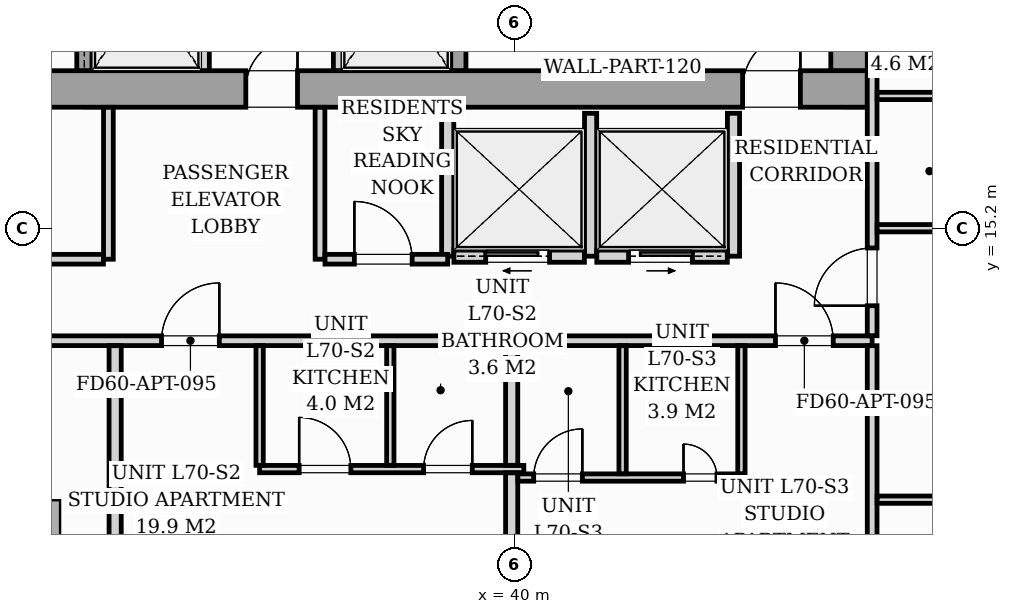
"""IFC4 building model, lengths in metres.
Left out: names, types, materials, properties, quantities, classifications, styles, units other than length and angle.
Written with IfcOpenShell. Run it as: python <this file> out.ifc"""

import sys

from ifc_helpers import new_model, si_unit, direction, frame, frame_2d, origin, origin_2d, place, context, subcontext, project, spatial, rectangle, i_section, extrude, source, transform, mapped, element, fill, save


model = new_model("IFC4")
c1 = context("Model", 3, precision=1e-05, world=origin(), true_north=direction((0.0, 1.0)))
c2 = subcontext(c1, "Body", "Model", "MODEL_VIEW")
j1 = project(units=[si_unit("LENGTHUNIT", "METRE"), si_unit("PLANEANGLEUNIT", "RADIAN")], contexts=[c1])
p1 = place(None, origin())
s1 = spatial("IfcSite", under=j1, at=p1, CompositionType="ELEMENT")
p2 = place(p1, origin())
s2 = spatial("IfcBuilding", under=s1, at=p2, CompositionType="ELEMENT")
p3 = place(p2, frame((0.0, 0.0, 243.0)))
s3 = spatial("IfcBuildingStorey", under=s2, at=p3, CompositionType="ELEMENT", Elevation=243.0)
m1 = source(origin(), c2, "Body", "SweptSolid", [
    extrude(i_section(OverallWidth=0.409, OverallDepth=0.425, WebThickness=0.033, FlangeThickness=0.052, FilletRadius=0.018, at=origin_2d()), origin(), (0.0, 0.0, 1.0), 3.296),
])
for number, where, z_axis, x_axis in (
    (1, (33.12, 17.4, 0.002), (0.0, 0.0, 1.0), (1.0, 0.0, 0.0)),
    (2, (38.88, 17.4, 0.002), (0.0, 0.0, 1.0), (1.0, 0.0, 0.0)),
    (3, (45.6, 17.4, 0.002), (0.0, 0.0, 1.0), (1.0, 0.0, 0.0)),
):
    element("IfcColumn", number, at=place(p3, frame(where, z_axis=z_axis, x_axis=x_axis)), inside=s3, PredefinedType="PILASTER", context=c2, shape_type="MappedRepresentation", body=[
        mapped(m1, transform((0.0, 0.0, 0.0), scale=1.0)),
    ])
m2 = source(origin(), c2, "Body", "SweptSolid", [
    extrude(rectangle(XDim=0.85, YDim=0.85, at=origin_2d()), origin(), (0.0, 0.0, 1.0), 3.296),
])
p4 = place(p3, frame((32.1, 10.312, 0.002), z_axis=(0.0, 0.0, 1.0), x_axis=(0.995884398616, -0.090632580198, 0.0)))
e4 = element("IfcColumn", 4, at=p4, inside=s3, PredefinedType="COLUMN", context=c2, shape_type="MappedRepresentation", body=[
    mapped(m2, transform((0.0, 0.0, 0.0), scale=1.0)),
])
p5 = place(p3, frame((26.2, 17.5, 0.0), z_axis=(0.0, 0.0, 1.0), x_axis=(1.0, 0.0, 0.0)))
e5 = element("IfcWall", 5, at=p5, inside=s3, PredefinedType="SHEAR", context=c2, shape_type="SweptSolid", body=[
    extrude(rectangle(XDim=19.6, YDim=0.6, at=frame_2d((9.8, 0.0))), origin(), (0.0, 0.0, 1.0), 3.3),
])
p6 = place(p5, frame((0.95, 0.0, 0.0)))
e6 = element("IfcOpeningElement", 6, at=p6, cuts=e5, PredefinedType="OPENING", context=c2, shape_type="SweptSolid", body=[
    extrude(rectangle(XDim=0.95, YDim=2.06, at=frame_2d((0.475, 1.03))), frame((0.0, 0.31, 0.0), z_axis=(0.0, -1.0, 0.0), x_axis=(1.0, 0.0, 0.0)), (0.0, 0.0, 1.0), 0.62),
])
p7 = place(p5, frame((9.38, 0.0, 0.0)))
e7 = element("IfcOpeningElement", 7, at=p7, cuts=e5, PredefinedType="OPENING", context=c2, shape_type="SweptSolid", body=[
    extrude(rectangle(XDim=0.85, YDim=2.0, at=frame_2d((0.425, 1.0))), frame((0.0, 0.31, 0.0), z_axis=(0.0, -1.0, 0.0), x_axis=(1.0, 0.0, 0.0)), (0.0, 0.0, 1.0), 0.62),
])
p8 = place(p5, frame((17.55, 0.0, 0.0)))
e8 = element("IfcOpeningElement", 8, at=p8, cuts=e5, PredefinedType="OPENING", context=c2, shape_type="SweptSolid", body=[
    extrude(rectangle(XDim=0.95, YDim=2.06, at=frame_2d((0.475, 1.03))), frame((0.0, 0.31, 0.0), z_axis=(0.0, -1.0, 0.0), x_axis=(1.0, 0.0, 0.0)), (0.0, 0.0, 1.0), 0.62),
])
p9 = place(p3, frame((45.5, 17.802, 0.0), z_axis=(0.0, 0.0, 1.0), x_axis=(0.0, 1.0, 0.0)))
e9 = element("IfcWall", 9, at=p9, inside=s3, PredefinedType="SHEAR", context=c2, shape_type="SweptSolid", body=[
    extrude(rectangle(XDim=5.796, YDim=0.6, at=frame_2d((2.898, 0.0))), origin(), (0.0, 0.0, 1.0), 3.3),
])
p10 = place(p3, frame((32.925, 17.802, 0.0), z_axis=(0.0, 0.0, 1.0), x_axis=(0.0, 1.0, 0.0)))
e10 = element("IfcWall", 10, at=p10, inside=s3, PredefinedType="SOLIDWALL", context=c2, shape_type="SweptSolid", body=[
    extrude(rectangle(XDim=2.646, YDim=0.25, at=frame_2d((1.323, 0.0))), origin(), (0.0, 0.0, 1.0), 3.3),
])
p11 = place(p10, frame((0.548, 0.0, 0.0)))
e11 = element("IfcOpeningElement", 11, at=p11, cuts=e10, PredefinedType="OPENING", context=c2, shape_type="SweptSolid", body=[
    extrude(rectangle(XDim=1.1, YDim=2.08, at=frame_2d((0.55, 1.04))), frame((0.0, 0.135, 0.0), z_axis=(0.0, -1.0, 0.0), x_axis=(1.0, 0.0, 0.0)), (0.0, 0.0, 1.0), 0.27),
])
for number, where, z_axis, x_axis in (
    (12, (34.9, 17.802, 0.0), (0.0, 0.0, 1.0), (0.0, 1.0, 0.0)),
    (13, (37.1, 17.802, 0.0), (0.0, 0.0, 1.0), (0.0, 1.0, 0.0)),
):
    element("IfcWall", number, at=place(p3, frame(where, z_axis=z_axis, x_axis=x_axis)), inside=s3, PredefinedType="PARTITIONING", context=c2, shape_type="SweptSolid", body=[
        extrude(rectangle(XDim=2.646, YDim=0.16, at=frame_2d((1.323, 0.0))), origin(), (0.0, 0.0, 1.0), 3.04),
    ])
p12 = place(p3, frame((39.075, 17.802, 0.0), z_axis=(0.0, 0.0, 1.0), x_axis=(0.0, 1.0, 0.0)))
e14 = element("IfcWall", 14, at=p12, inside=s3, PredefinedType="SOLIDWALL", context=c2, shape_type="SweptSolid", body=[
    extrude(rectangle(XDim=2.646, YDim=0.25, at=frame_2d((1.323, 0.0))), origin(), (0.0, 0.0, 1.0), 3.3),
])
p13 = place(p12, frame((0.548, 0.0, 0.0)))
e15 = element("IfcOpeningElement", 15, at=p13, cuts=e14, PredefinedType="OPENING", context=c2, shape_type="SweptSolid", body=[
    extrude(rectangle(XDim=1.1, YDim=2.08, at=frame_2d((0.55, 1.04))), frame((0.0, 0.135, 0.0), z_axis=(0.0, -1.0, 0.0), x_axis=(1.0, 0.0, 0.0)), (0.0, 0.0, 1.0), 0.27),
])
for number, where, z_axis, x_axis in (
    (16, (38.9, 14.75, 0.0), (0.0, 0.0, 1.0), (0.0, 1.0, 0.0)),
    (17, (41.25, 14.75, 0.0), (0.0, 0.0, 1.0), (0.0, 1.0, 0.0)),
    (18, (43.6, 14.75, 0.0), (0.0, 0.0, 1.0), (0.0, 1.0, 0.0)),
):
    element("IfcWall", number, at=place(p3, frame(where, z_axis=z_axis, x_axis=x_axis)), inside=s3, PredefinedType="PARTITIONING", context=c2, shape_type="SweptSolid", body=[
        extrude(rectangle(XDim=2.35, YDim=0.2, at=frame_2d((1.175, 0.0))), origin(), (0.0, 0.0, 1.0), 3.04),
    ])
p14 = place(p3, frame((39.002, 14.75, 0.0), z_axis=(0.0, 0.0, 1.0), x_axis=(1.0, 0.0, 0.0)))
e19 = element("IfcWall", 19, at=p14, inside=s3, PredefinedType="PARTITIONING", context=c2, shape_type="SweptSolid", body=[
    extrude(rectangle(XDim=2.146, YDim=0.2, at=frame_2d((1.073, 0.0))), origin(), (0.0, 0.0, 1.0), 3.04),
])
p15 = place(p14, frame((0.523, 0.0, 0.0)))
e20 = element("IfcOpeningElement", 20, at=p15, cuts=e19, PredefinedType="OPENING", context=c2, shape_type="SweptSolid", body=[
    extrude(rectangle(XDim=1.05, YDim=2.08, at=frame_2d((0.525, 1.04))), frame((0.0, 0.11, 0.0), z_axis=(0.0, -1.0, 0.0), x_axis=(1.0, 0.0, 0.0)), (0.0, 0.0, 1.0), 0.22),
])
p16 = place(p3, frame((41.352, 14.75, 0.0), z_axis=(0.0, 0.0, 1.0), x_axis=(1.0, 0.0, 0.0)))
e21 = element("IfcWall", 21, at=p16, inside=s3, PredefinedType="PARTITIONING", context=c2, shape_type="SweptSolid", body=[
    extrude(rectangle(XDim=2.146, YDim=0.2, at=frame_2d((1.073, 0.0))), origin(), (0.0, 0.0, 1.0), 3.04),
])
p17 = place(p16, frame((0.523, 0.0, 0.0)))
e22 = element("IfcOpeningElement", 22, at=p17, cuts=e21, PredefinedType="OPENING", context=c2, shape_type="SweptSolid", body=[
    extrude(rectangle(XDim=1.05, YDim=2.08, at=frame_2d((0.525, 1.04))), frame((0.0, 0.11, 0.0), z_axis=(0.0, -1.0, 0.0), x_axis=(1.0, 0.0, 0.0)), (0.0, 0.0, 1.0), 0.22),
])
p18 = place(p3, frame((26.12, 13.36, 0.0), z_axis=(0.0, 0.0, 1.0), x_axis=(1.0, 0.0, 0.0)))
e23 = element("IfcWall", 23, at=p18, inside=s3, PredefinedType="PARTITIONING", context=c2, shape_type="SweptSolid", body=[
    extrude(rectangle(XDim=19.76, YDim=0.16, at=frame_2d((9.88, 0.0))), origin(), (0.0, 0.0, 1.0), 2.55),
])
p19 = place(p18, frame((5.221, 0.0, 0.0)))
e24 = element("IfcOpeningElement", 24, at=p19, cuts=e23, PredefinedType="OPENING", context=c2, shape_type="SweptSolid", body=[
    extrude(rectangle(XDim=0.95, YDim=2.06, at=frame_2d((0.475, 1.03))), frame((0.0, 0.09, 0.0), z_axis=(0.0, -1.0, 0.0), x_axis=(1.0, 0.0, 0.0)), (0.0, 0.0, 1.0), 0.18),
])
p20 = place(p18, frame((8.074, 0.0, 0.0)))
e25 = element("IfcOpeningElement", 25, at=p20, cuts=e23, PredefinedType="OPENING", context=c2, shape_type="SweptSolid", body=[
    extrude(rectangle(XDim=0.95, YDim=2.06, at=frame_2d((0.475, 1.03))), frame((0.0, 0.09, 0.0), z_axis=(0.0, -1.0, 0.0), x_axis=(1.0, 0.0, 0.0)), (0.0, 0.0, 1.0), 0.18),
])
p21 = place(p18, frame((18.17, 0.0, 0.0)))
e26 = element("IfcOpeningElement", 26, at=p21, cuts=e23, PredefinedType="OPENING", context=c2, shape_type="SweptSolid", body=[
    extrude(rectangle(XDim=0.95, YDim=2.06, at=frame_2d((0.475, 1.03))), frame((0.0, 0.09, 0.0), z_axis=(0.0, -1.0, 0.0), x_axis=(1.0, 0.0, 0.0)), (0.0, 0.0, 1.0), 0.18),
])
p22 = place(p3, frame((45.88, 8.136, 0.0), z_axis=(0.0, 0.0, 1.0), x_axis=(0.0, 1.0, 0.0)))
e27 = element("IfcWall", 27, at=p22, inside=s3, PredefinedType="PARTITIONING", context=c2, shape_type="SweptSolid", body=[
    extrude(rectangle(XDim=5.142, YDim=0.16, at=frame_2d((2.571, 0.0))), origin(), (0.0, 0.0, 1.0), 3.04),
])
p23 = place(p3, frame((45.88, 13.442, 0.0), z_axis=(0.0, 0.0, 1.0), x_axis=(0.0, 1.0, 0.0)))
e28 = element("IfcWall", 28, at=p23, inside=s3, PredefinedType="PARTITIONING", context=c2, shape_type="SweptSolid", body=[
    extrude(rectangle(XDim=4.36, YDim=0.16, at=frame_2d((2.18, 0.0))), origin(), (0.0, 0.0, 1.0), 3.04),
])
p24 = place(p23, frame((0.493, 0.0, 0.0)))
e29 = element("IfcOpeningElement", 29, at=p24, cuts=e28, PredefinedType="OPENING", context=c2, shape_type="SweptSolid", body=[
    extrude(rectangle(XDim=0.95, YDim=2.06, at=frame_2d((0.475, 1.03))), frame((0.0, 0.09, 0.0), z_axis=(0.0, -1.0, 0.0), x_axis=(1.0, 0.0, 0.0)), (0.0, 0.0, 1.0), 0.18),
])
p25 = place(p3, frame((33.431, 9.086, 0.0), z_axis=(0.0, 0.0, 1.0), x_axis=(0.0, 1.0, 0.0)))
e30 = element("IfcWall", 30, at=p25, inside=s3, PredefinedType="PARTITIONING", context=c2, shape_type="SweptSolid", body=[
    extrude(rectangle(XDim=4.192, YDim=0.2, at=frame_2d((2.096, 0.0))), origin(), (0.0, 0.0, 1.0), 3.04),
])
p26 = place(p3, frame((35.807, 11.249, 0.0), z_axis=(0.0, 0.0, 1.0), x_axis=(1.0, 0.0, 0.0)))
e31 = element("IfcWall", 31, at=p26, inside=s3, PredefinedType="PARTITIONING", context=c2, shape_type="SweptSolid", body=[
    extrude(rectangle(XDim=4.345, YDim=0.12, at=frame_2d((2.173, 0.0))), origin(), (0.0, 0.0, 1.0), 3.04),
])
p27 = place(p26, frame((0.65, 0.0, 0.0)))
e32 = element("IfcOpeningElement", 32, at=p27, cuts=e31, PredefinedType="OPENING", context=c2, shape_type="SweptSolid", body=[
    extrude(rectangle(XDim=0.85, YDim=2.05, at=frame_2d((0.425, 1.025))), frame((0.0, 0.07, 0.0), z_axis=(0.0, -1.0, 0.0), x_axis=(1.0, 0.0, 0.0)), (0.0, 0.0, 1.0), 0.14),
])
p28 = place(p26, frame((2.697, 0.0, 0.0)))
e33 = element("IfcOpeningElement", 33, at=p28, cuts=e31, PredefinedType="OPENING", context=c2, shape_type="SweptSolid", body=[
    extrude(rectangle(XDim=0.8, YDim=2.02, at=frame_2d((0.4, 1.01))), frame((0.0, 0.07, 0.0), z_axis=(0.0, -1.0, 0.0), x_axis=(1.0, 0.0, 0.0)), (0.0, 0.0, 1.0), 0.14),
])
for number, where, z_axis, x_axis in (
    (34, (35.807, 11.311, 0.0), (0.0, 0.0, 1.0), (0.0, 1.0, 0.0)),
    (35, (37.956, 11.311, 0.0), (0.0, 0.0, 1.0), (0.0, 1.0, 0.0)),
):
    element("IfcWall", number, at=place(p3, frame(where, z_axis=z_axis, x_axis=x_axis)), inside=s3, PredefinedType="PARTITIONING", context=c2, shape_type="SweptSolid", body=[
        extrude(rectangle(XDim=1.967, YDim=0.12, at=frame_2d((0.983, 0.0))), origin(), (0.0, 0.0, 1.0), 3.04),
    ])
p29 = place(p3, frame((39.952, 8.675, 0.0), z_axis=(0.0, 0.0, 1.0), x_axis=(0.0, 1.0, 0.0)))
e36 = element("IfcWall", 36, at=p29, inside=s3, PredefinedType="PARTITIONING", context=c2, shape_type="SweptSolid", body=[
    extrude(rectangle(XDim=2.512, YDim=0.2, at=frame_2d((1.256, 0.0))), origin(), (0.0, 0.0, 1.0), 3.04),
])
p30 = place(p3, frame((39.952, 11.311, 0.0), z_axis=(0.0, 0.0, 1.0), x_axis=(0.0, 1.0, 0.0)))
e37 = element("IfcWall", 37, at=p30, inside=s3, PredefinedType="PARTITIONING", context=c2, shape_type="SweptSolid", body=[
    extrude(rectangle(XDim=1.967, YDim=0.2, at=frame_2d((0.983, 0.0))), origin(), (0.0, 0.0, 1.0), 3.04),
])
p31 = place(p3, frame((40.054, 11.11, 0.0), z_axis=(0.0, 0.0, 1.0), x_axis=(1.0, 0.0, 0.0)))
e38 = element("IfcWall", 38, at=p31, inside=s3, PredefinedType="PARTITIONING", context=c2, shape_type="SweptSolid", body=[
    extrude(rectangle(XDim=3.676, YDim=0.12, at=frame_2d((1.838, 0.0))), origin(), (0.0, 0.0, 1.0), 3.04),
])
p32 = place(p31, frame((0.26, 0.0, 0.0)))
e39 = element("IfcOpeningElement", 39, at=p32, cuts=e38, PredefinedType="OPENING", context=c2, shape_type="SweptSolid", body=[
    extrude(rectangle(XDim=0.8, YDim=2.02, at=frame_2d((0.4, 1.01))), frame((0.0, 0.07, 0.0), z_axis=(0.0, -1.0, 0.0), x_axis=(1.0, 0.0, 0.0)), (0.0, 0.0, 1.0), 0.14),
])
p33 = place(p31, frame((2.724, 0.0, 0.0)))
e40 = element("IfcOpeningElement", 40, at=p33, cuts=e38, PredefinedType="OPENING", context=c2, shape_type="SweptSolid", body=[
    extrude(rectangle(XDim=0.55, YDim=2.0, at=frame_2d((0.275, 1.0))), frame((0.0, 0.07, 0.0), z_axis=(0.0, -1.0, 0.0), x_axis=(1.0, 0.0, 0.0)), (0.0, 0.0, 1.0), 0.14),
])
for number, where, z_axis, x_axis in (
    (41, (43.73, 11.172, 0.0), (0.0, 0.0, 1.0), (0.0, 1.0, 0.0)),
    (42, (41.776, 11.172, 0.0), (0.0, 0.0, 1.0), (0.0, 1.0, 0.0)),
):
    element("IfcWall", number, at=place(p3, frame(where, z_axis=z_axis, x_axis=x_axis)), inside=s3, PredefinedType="PARTITIONING", context=c2, shape_type="SweptSolid", body=[
        extrude(rectangle(XDim=2.106, YDim=0.12, at=frame_2d((1.053, 0.0))), origin(), (0.0, 0.0, 1.0), 3.04),
    ])
p34 = place(p3, frame((45.962, 17.385, 0.0), z_axis=(0.0, 0.0, 1.0), x_axis=(1.0, 0.0, 0.0)))
e43 = element("IfcWall", 43, at=p34, inside=s3, PredefinedType="PARTITIONING", context=c2, shape_type="SweptSolid", body=[
    extrude(rectangle(XDim=2.256, YDim=0.12, at=frame_2d((1.128, 0.0))), origin(), (0.0, 0.0, 1.0), 2.381),
])
p35 = place(p3, frame((45.962, 15.21, 0.0), z_axis=(0.0, 0.0, 1.0), x_axis=(1.0, 0.0, 0.0)))
e44 = element("IfcWall", 44, at=p35, inside=s3, PredefinedType="PARTITIONING", context=c2, shape_type="SweptSolid", body=[
    extrude(rectangle(XDim=2.256, YDim=0.12, at=frame_2d((1.128, 0.0))), origin(), (0.0, 0.0, 1.0), 3.04),
])
p36 = place(p3, frame((45.962, 10.746, 0.0), z_axis=(0.0, 0.0, 1.0), x_axis=(1.0, 0.0, 0.0)))
e45 = element("IfcWall", 45, at=p36, inside=s3, PredefinedType="PARTITIONING", context=c2, shape_type="SweptSolid", body=[
    extrude(rectangle(XDim=9.594, YDim=0.12, at=frame_2d((4.797, 0.0))), origin(), (0.0, 0.0, 1.0), 3.04),
])
p37 = place(p36, frame((4.378, 0.0, 0.0)))
e46 = element("IfcOpeningElement", 46, at=p37, cuts=e45, PredefinedType="OPENING", context=c2, shape_type="SweptSolid", body=[
    extrude(rectangle(XDim=0.85, YDim=2.05, at=frame_2d((0.425, 1.025))), frame((0.0, 0.07, 0.0), z_axis=(0.0, -1.0, 0.0), x_axis=(1.0, 0.0, 0.0)), (0.0, 0.0, 1.0), 0.14),
])
p38 = place(p3, frame((33.32, 14.7, 0.0), z_axis=(0.0, 0.0, 1.0), x_axis=(0.0, 1.0, 0.0)))
e47 = element("IfcWall", 47, at=p38, inside=s3, PredefinedType="PARTITIONING", context=c2, shape_type="SweptSolid", body=[
    extrude(rectangle(XDim=2.498, YDim=0.16, at=frame_2d((1.249, 0.0))), origin(), (0.0, 0.0, 1.0), 3.04),
])
p39 = place(p3, frame((28.442, 14.7, 0.0), z_axis=(0.0, 0.0, 1.0), x_axis=(1.0, 0.0, 0.0)))
e48 = element("IfcWall", 48, at=p39, inside=s3, PredefinedType="PARTITIONING", context=c2, shape_type="SweptSolid", body=[
    extrude(rectangle(XDim=4.796, YDim=0.16, at=frame_2d((2.398, 0.0))), origin(), (0.0, 0.0, 1.0), 2.55),
])
p40 = place(p39, frame((1.923, 0.0, 0.0)))
e49 = element("IfcOpeningElement", 49, at=p40, cuts=e48, PredefinedType="OPENING", context=c2, shape_type="SweptSolid", body=[
    extrude(rectangle(XDim=0.95, YDim=2.06, at=frame_2d((0.475, 1.03))), frame((0.0, 0.09, 0.0), z_axis=(0.0, -1.0, 0.0), x_axis=(1.0, 0.0, 0.0)), (0.0, 0.0, 1.0), 0.18),
])
p41 = place(p3, frame((36.8, 14.7, 0.0), z_axis=(0.0, 0.0, 1.0), x_axis=(0.0, 1.0, 0.0)))
e50 = element("IfcWall", 50, at=p41, inside=s3, PredefinedType="PARTITIONING", context=c2, shape_type="SweptSolid", body=[
    extrude(rectangle(XDim=2.498, YDim=0.16, at=frame_2d((1.249, 0.0))), origin(), (0.0, 0.0, 1.0), 3.04),
])
p42 = place(p3, frame((36.882, 14.7, 0.0), z_axis=(0.0, 0.0, 1.0), x_axis=(1.0, 0.0, 0.0)))
e51 = element("IfcWall", 51, at=p42, inside=s3, PredefinedType="PARTITIONING", context=c2, shape_type="SweptSolid", body=[
    extrude(rectangle(XDim=2.018, YDim=0.16, at=frame_2d((1.009, 0.0))), origin(), (0.0, 0.0, 1.0), 3.04),
])
p43 = place(p42, frame((0.483, 0.0, 0.0)))
e52 = element("IfcOpeningElement", 52, at=p43, cuts=e51, PredefinedType="OPENING", context=c2, shape_type="SweptSolid", body=[
    extrude(rectangle(XDim=0.95, YDim=2.06, at=frame_2d((0.475, 1.03))), frame((0.0, 0.09, 0.0), z_axis=(0.0, -1.0, 0.0), x_axis=(1.0, 0.0, 0.0)), (0.0, 0.0, 1.0), 0.18),
])
m3 = source(origin(), c2, "Body", "SweptSolid", [
    extrude(rectangle(XDim=0.85, YDim=2.0, at=frame_2d((0.425, 1.0))), frame((0.0, 0.025, 0.0), z_axis=(0.0, -1.0, 0.0), x_axis=(1.0, 0.0, 0.0)), (0.0, 0.0, 1.0), 0.05),
])
p44 = place(p7, origin())
e53 = element("IfcDoor", 53, at=p44, inside=s3, OperationType="SINGLE_SWING_RIGHT", PredefinedType="DOOR", context=c2, shape_type="MappedRepresentation", body=[
    mapped(m3, transform((0.0, 0.0, 0.0), scale=1.0)),
])
fill(e7, e53)
m4 = source(origin(), c2, "Body", "SweptSolid", [
    extrude(rectangle(XDim=0.95, YDim=2.06, at=frame_2d((0.475, 1.03))), frame((0.0, 0.025, 0.0), z_axis=(0.0, -1.0, 0.0), x_axis=(1.0, 0.0, 0.0)), (0.0, 0.0, 1.0), 0.05),
])
p45 = place(p8, origin())
e54 = element("IfcDoor", 54, at=p45, inside=s3, OperationType="SINGLE_SWING_RIGHT", PredefinedType="DOOR", context=c2, shape_type="MappedRepresentation", body=[
    mapped(m4, transform((0.0, 0.0, 0.0), scale=1.0)),
])
fill(e8, e54)
m5 = source(origin(), c2, "Body", "SweptSolid", [
    extrude(rectangle(XDim=1.05, YDim=2.08, at=frame_2d((0.525, 1.04))), frame((0.0, 0.025, 0.0), z_axis=(0.0, -1.0, 0.0), x_axis=(1.0, 0.0, 0.0)), (0.0, 0.0, 1.0), 0.05),
])
p46 = place(p15, origin())
e55 = element("IfcDoor", 55, at=p46, inside=s3, OperationType="SLIDING_TO_LEFT", PredefinedType="DOOR", context=c2, shape_type="MappedRepresentation", body=[
    mapped(m5, transform((0.0, 0.0, 0.0), scale=1.0)),
])
fill(e20, e55)
p47 = place(p17, origin())
e56 = element("IfcDoor", 56, at=p47, inside=s3, OperationType="SLIDING_TO_RIGHT", PredefinedType="DOOR", context=c2, shape_type="MappedRepresentation", body=[
    mapped(m5, transform((0.0, 0.0, 0.0), scale=1.0)),
])
fill(e22, e56)
m6 = source(origin(), c2, "Body", "SweptSolid", [
    extrude(rectangle(XDim=0.95, YDim=2.06, at=frame_2d((0.475, 1.03))), frame((0.0, 0.025, 0.0), z_axis=(0.0, -1.0, 0.0), x_axis=(1.0, 0.0, 0.0)), (0.0, 0.0, 1.0), 0.05),
])
p48 = place(p20, origin())
e57 = element("IfcDoor", 57, at=p48, inside=s3, OperationType="SINGLE_SWING_RIGHT", PredefinedType="DOOR", context=c2, shape_type="MappedRepresentation", body=[
    mapped(m6, transform((0.0, 0.0, 0.0), scale=1.0)),
])
fill(e25, e57)
m7 = source(origin(), c2, "Body", "SweptSolid", [
    extrude(rectangle(XDim=0.85, YDim=2.05, at=frame_2d((0.425, 1.025))), frame((0.0, 0.025, 0.0), z_axis=(0.0, -1.0, 0.0), x_axis=(1.0, 0.0, 0.0)), (0.0, 0.0, 1.0), 0.05),
])
p49 = place(p27, origin())
e58 = element("IfcDoor", 58, at=p49, inside=s3, OperationType="SINGLE_SWING_LEFT", PredefinedType="DOOR", context=c2, shape_type="MappedRepresentation", body=[
    mapped(m7, transform((0.0, 0.0, 0.0), scale=1.0)),
])
fill(e32, e58)
m8 = source(origin(), c2, "Body", "SweptSolid", [
    extrude(rectangle(XDim=0.8, YDim=2.02, at=frame_2d((0.4, 1.01))), frame((0.0, 0.025, 0.0), z_axis=(0.0, -1.0, 0.0), x_axis=(1.0, 0.0, 0.0)), (0.0, 0.0, 1.0), 0.05),
])
p50 = place(p28, origin())
e59 = element("IfcDoor", 59, at=p50, inside=s3, OperationType="SINGLE_SWING_RIGHT", PredefinedType="DOOR", context=c2, shape_type="MappedRepresentation", body=[
    mapped(m8, transform((0.0, 0.0, 0.0), scale=1.0)),
])
fill(e33, e59)
p51 = place(p21, origin())
e60 = element("IfcDoor", 60, at=p51, inside=s3, OperationType="SINGLE_SWING_LEFT", PredefinedType="DOOR", context=c2, shape_type="MappedRepresentation", body=[
    mapped(m6, transform((0.0, 0.0, 0.0), scale=1.0)),
])
fill(e26, e60)
p52 = place(p32, origin())
e61 = element("IfcDoor", 61, at=p52, inside=s3, OperationType="SINGLE_SWING_RIGHT", PredefinedType="DOOR", context=c2, shape_type="MappedRepresentation", body=[
    mapped(m8, transform((0.0, 0.0, 0.0), scale=1.0)),
])
fill(e39, e61)
m9 = source(origin(), c2, "Body", "SweptSolid", [
    extrude(rectangle(XDim=0.55, YDim=2.0, at=frame_2d((0.275, 1.0))), frame((0.0, 0.025, 0.0), z_axis=(0.0, -1.0, 0.0), x_axis=(1.0, 0.0, 0.0)), (0.0, 0.0, 1.0), 0.05),
])
p53 = place(p33, origin())
e62 = element("IfcDoor", 62, at=p53, inside=s3, OperationType="SINGLE_SWING_LEFT", PredefinedType="DOOR", context=c2, shape_type="MappedRepresentation", body=[
    mapped(m9, transform((0.0, 0.0, 0.0), scale=1.0)),
])
fill(e40, e62)
p54 = place(p24, origin())
e63 = element("IfcDoor", 63, at=p54, inside=s3, OperationType="SINGLE_SWING_LEFT", PredefinedType="DOOR", context=c2, shape_type="MappedRepresentation", body=[
    mapped(m6, transform((0.0, 0.0, 0.0), scale=1.0)),
])
fill(e29, e63)
p55 = place(p43, origin())
e64 = element("IfcDoor", 64, at=p55, inside=s3, OperationType="SINGLE_SWING_LEFT", PredefinedType="DOOR", context=c2, shape_type="MappedRepresentation", body=[
    mapped(m6, transform((0.0, 0.0, 0.0), scale=1.0)),
])
fill(e52, e64)
save(model, sys.argv[1])
